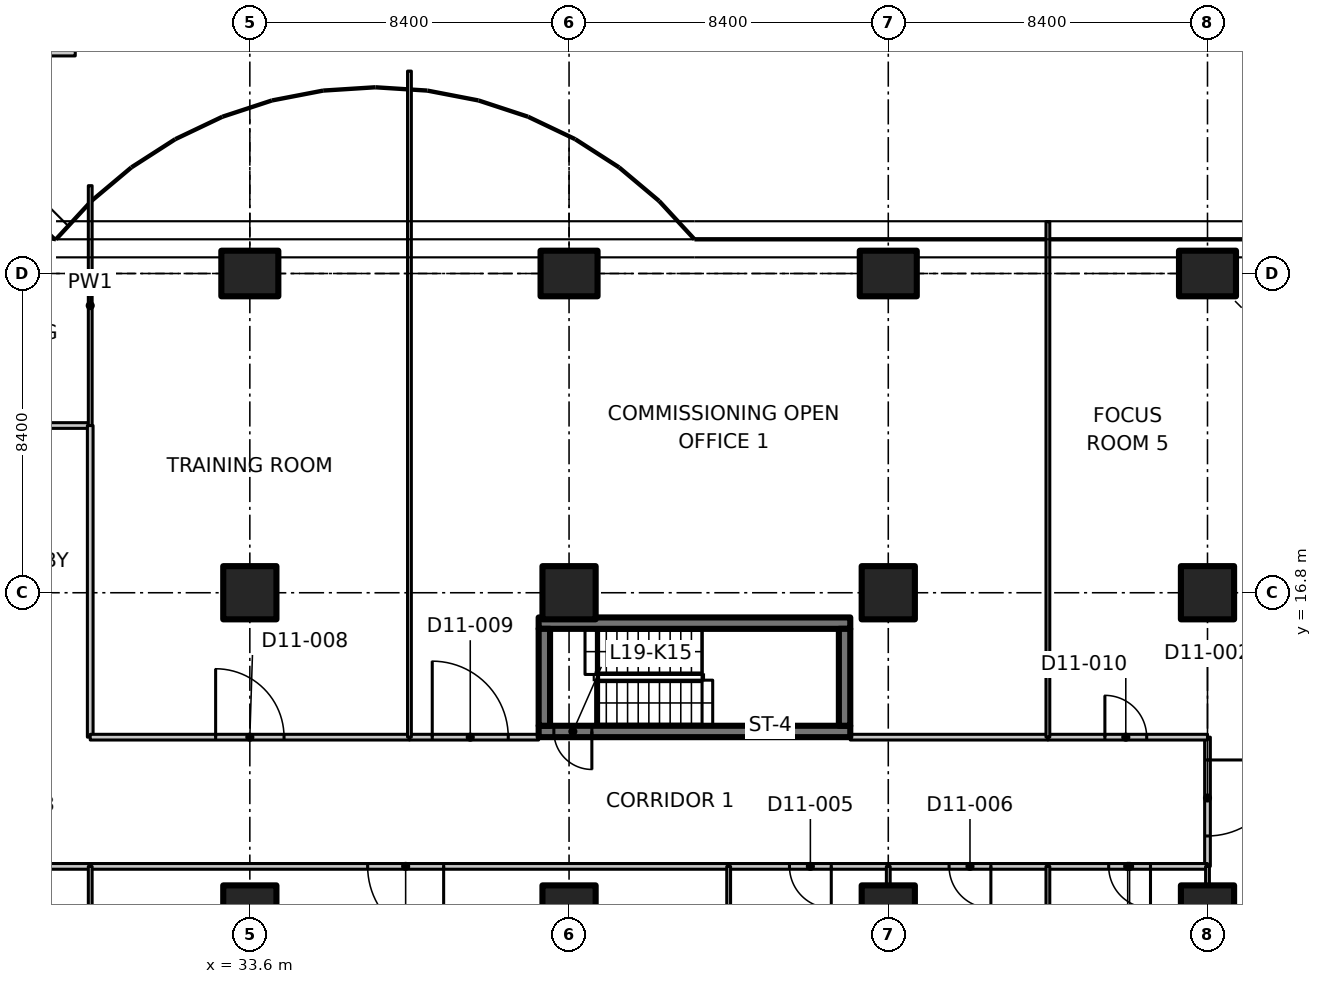
"""IFC4 building model, lengths in metres.
Left out: names, types, materials, properties, quantities, classifications, styles, units other than length and angle.
Written with IfcOpenShell. Run it as: python <this file> out.ifc"""

import sys

from ifc_helpers import new_model, si_unit, direction, frame, frame_2d, origin, origin_2d, place, context, subcontext, project, spatial, polyline, rectangle, outline, extrude, element, fill, save


model = new_model("IFC4")
c1 = context("Model", 3, precision=1e-05, world=origin(), true_north=direction((0.0, 1.0)))
c2 = subcontext(c1, "Body", "Model", "MODEL_VIEW")
j1 = project(units=[si_unit("LENGTHUNIT", "METRE"), si_unit("PLANEANGLEUNIT", "RADIAN")], contexts=[c1])
p1 = place(None, origin())
s1 = spatial("IfcSite", under=j1, at=p1, CompositionType="ELEMENT")
p2 = place(p1, origin())
s2 = spatial("IfcBuilding", under=s1, at=p2, CompositionType="ELEMENT")
p3 = place(p2, frame((0.0, 0.0, 83.3)))
s3 = spatial("IfcBuildingStorey", under=s2, at=p3, CompositionType="ELEMENT", Elevation=83.3)
for number, where, z_axis, x_axis in (
    (1, (33.6, 8.4, 0.0), (0.0, 0.0, 1.0), (1.0, 0.0, 0.0)),
    (2, (33.6, 16.8, 0.0), (0.0, 0.0, 1.0), (1.0, 0.0, 0.0)),
):
    element("IfcColumn", number, at=place(p3, frame(where, z_axis=z_axis, x_axis=x_axis)), inside=s3, PredefinedType="COLUMN", context=c2, shape_type="SweptSolid", body=[
        extrude(rectangle(XDim=1.4, YDim=1.4, at=origin_2d()), origin(), (0.0, 0.0, 1.0), 3.3),
    ])
p4 = place(p3, frame((33.6, 25.2, 0.0), z_axis=(0.0, 0.0, 1.0), x_axis=(0.0, 1.0, 0.0)))
e3 = element("IfcColumn", 3, at=p4, inside=s3, PredefinedType="COLUMN", context=c2, shape_type="SweptSolid", body=[
    extrude(rectangle(XDim=1.2, YDim=1.5, at=origin_2d()), origin(), (0.0, 0.0, 1.0), 3.3),
])
for number, where, z_axis, x_axis in (
    (4, (42.0, 8.4, 0.0), (0.0, 0.0, 1.0), (1.0, 0.0, 0.0)),
    (5, (42.0, 16.8, 0.0), (0.0, 0.0, 1.0), (1.0, 0.0, 0.0)),
):
    element("IfcColumn", number, at=place(p3, frame(where, z_axis=z_axis, x_axis=x_axis)), inside=s3, PredefinedType="COLUMN", context=c2, shape_type="SweptSolid", body=[
        extrude(rectangle(XDim=1.4, YDim=1.4, at=origin_2d()), origin(), (0.0, 0.0, 1.0), 3.3),
    ])
p5 = place(p3, frame((42.0, 25.2, 0.0), z_axis=(0.0, 0.0, 1.0), x_axis=(0.0, 1.0, 0.0)))
e6 = element("IfcColumn", 6, at=p5, inside=s3, PredefinedType="COLUMN", context=c2, shape_type="SweptSolid", body=[
    extrude(rectangle(XDim=1.2, YDim=1.5, at=origin_2d()), origin(), (0.0, 0.0, 1.0), 3.3),
])
for number, where, z_axis, x_axis in (
    (7, (50.4, 8.4, 0.0), (0.0, 0.0, 1.0), (1.0, 0.0, 0.0)),
    (8, (50.4, 16.8, 0.0), (0.0, 0.0, 1.0), (1.0, 0.0, 0.0)),
):
    element("IfcColumn", number, at=place(p3, frame(where, z_axis=z_axis, x_axis=x_axis)), inside=s3, PredefinedType="COLUMN", context=c2, shape_type="SweptSolid", body=[
        extrude(rectangle(XDim=1.4, YDim=1.4, at=origin_2d()), origin(), (0.0, 0.0, 1.0), 3.3),
    ])
p6 = place(p3, frame((50.4, 25.2, 0.0), z_axis=(0.0, 0.0, 1.0), x_axis=(0.0, 1.0, 0.0)))
e9 = element("IfcColumn", 9, at=p6, inside=s3, PredefinedType="COLUMN", context=c2, shape_type="SweptSolid", body=[
    extrude(rectangle(XDim=1.2, YDim=1.5, at=origin_2d()), origin(), (0.0, 0.0, 1.0), 3.3),
])
for number, where, z_axis, x_axis in (
    (10, (58.8, 8.4, 0.0), (0.0, 0.0, 1.0), (1.0, 0.0, 0.0)),
    (11, (58.8, 16.8, 0.0), (0.0, 0.0, 1.0), (1.0, 0.0, 0.0)),
):
    element("IfcColumn", number, at=place(p3, frame(where, z_axis=z_axis, x_axis=x_axis)), inside=s3, PredefinedType="COLUMN", context=c2, shape_type="SweptSolid", body=[
        extrude(rectangle(XDim=1.4, YDim=1.4, at=origin_2d()), origin(), (0.0, 0.0, 1.0), 3.3),
    ])
p7 = place(p3, frame((58.8, 25.2, 0.0), z_axis=(0.0, 0.0, 1.0), x_axis=(0.0, 1.0, 0.0)))
e12 = element("IfcColumn", 12, at=p7, inside=s3, PredefinedType="COLUMN", context=c2, shape_type="SweptSolid", body=[
    extrude(rectangle(XDim=1.2, YDim=1.5, at=origin_2d()), origin(), (0.0, 0.0, 1.0), 3.3),
])
p8 = place(p3, frame((49.4, 13.15, 0.0), z_axis=(0.0, 0.0, 1.0), x_axis=(-1.0, 0.0, 0.0)))
e13 = element("IfcWall", 13, at=p8, inside=s3, PredefinedType="SHEAR", context=c2, shape_type="SweptSolid", body=[
    extrude(rectangle(XDim=8.2, YDim=0.3, at=frame_2d((4.1, 0.0))), origin(), (0.0, 0.0, 1.0), 3.3),
])
p9 = place(p8, frame((6.8, 0.0, 0.0)))
e14 = element("IfcOpeningElement", 14, at=p9, cuts=e13, PredefinedType="OPENING", context=c2, shape_type="SweptSolid", body=[
    extrude(rectangle(XDim=1.0, YDim=2.1, at=frame_2d((0.5, 1.05))), frame((0.0, 0.16, 0.0), z_axis=(0.0, -1.0, 0.0), x_axis=(1.0, 0.0, 0.0)), (0.0, 0.0, 1.0), 0.32),
])
p10 = place(p3, frame((41.2, 16.0, 0.0), z_axis=(0.0, 0.0, 1.0), x_axis=(1.0, 0.0, 0.0)))
e15 = element("IfcWall", 15, at=p10, inside=s3, PredefinedType="SHEAR", context=c2, shape_type="SweptSolid", body=[
    extrude(rectangle(XDim=8.2, YDim=0.3, at=frame_2d((4.1, 0.0))), origin(), (0.0, 0.0, 1.0), 3.3),
])
for number, where, z_axis, x_axis in (
    (16, (41.35, 13.3, 0.0), (0.0, 0.0, 1.0), (0.0, 1.0, 0.0)),
    (17, (49.25, 13.3, 0.0), (0.0, 0.0, 1.0), (0.0, 1.0, 0.0)),
):
    element("IfcWall", number, at=place(p3, frame(where, z_axis=z_axis, x_axis=x_axis)), inside=s3, PredefinedType="SHEAR", context=c2, shape_type="SweptSolid", body=[
        extrude(rectangle(XDim=2.55, YDim=0.3, at=frame_2d((1.275, 0.0))), origin(), (0.0, 0.0, 1.0), 3.3),
    ])
p11 = place(p3, frame((25.2, 21.2, 0.0), z_axis=(0.0, 0.0, 1.0), x_axis=(1.0, 0.0, 0.0)))
e18 = element("IfcWall", 18, at=p11, inside=s3, PredefinedType="PARTITIONING", context=c2, shape_type="SweptSolid", body=[
    extrude(rectangle(XDim=4.2, YDim=0.15, at=frame_2d((2.1, 0.0))), origin(), (0.0, 0.0, 1.0), 3.28),
])
p12 = place(p3, frame((29.4, 9.6, 0.0), z_axis=(0.0, 0.0, 1.0), x_axis=(-1.0, 0.0, 0.0)))
e19 = element("IfcWall", 19, at=p12, inside=s3, PredefinedType="PARTITIONING", context=c2, shape_type="SweptSolid", body=[
    extrude(rectangle(XDim=4.2, YDim=0.15, at=frame_2d((2.1, 0.0))), origin(), (0.0, 0.0, 1.0), 3.28),
])
p13 = place(p12, frame((1.5, 0.0, 0.0)))
e20 = element("IfcOpeningElement", 20, at=p13, cuts=e19, PredefinedType="OPENING", context=c2, shape_type="SweptSolid", body=[
    extrude(rectangle(XDim=1.1, YDim=2.1, at=frame_2d((0.55, 1.05))), frame((0.0, 0.085, 0.0), z_axis=(0.0, -1.0, 0.0), x_axis=(1.0, 0.0, 0.0)), (0.0, 0.0, 1.0), 0.17),
])
p14 = place(p3, frame((29.4, 21.2, 0.0), z_axis=(0.0, 0.0, 1.0), x_axis=(0.0, -1.0, 0.0)))
e21 = element("IfcWall", 21, at=p14, inside=s3, PredefinedType="PARTITIONING", context=c2, shape_type="SweptSolid", body=[
    extrude(rectangle(XDim=8.2, YDim=0.15, at=frame_2d((4.1, 0.0))), origin(), (0.0, 0.0, 1.0), 3.28),
])
p15 = place(p3, frame((29.4, 27.511, 0.0), z_axis=(0.0, 0.0, 1.0), x_axis=(0.0, -1.0, 0.0)))
e22 = element("IfcWall", 22, at=p15, inside=s3, PredefinedType="PARTITIONING", context=c2, shape_type="SweptSolid", body=[
    extrude(outline(polyline([(0.0, 0.0), (6.311, 0.0), (6.311, 3.28), (2.761, 3.28), (2.759, 2.93), (1.863, 2.93), (1.861, 3.28), (0.236, 3.28), (0.0, 3.28), (0.0, 0.0)])), frame((0.0, 0.05, 0.0), z_axis=(0.0, -1.0, 0.0), x_axis=(1.0, 0.0, 0.0)), (0.0, 0.0, 1.0), 0.1),
])
p16 = place(p3, frame((25.2, 31.0, 0.0), z_axis=(0.0, 0.0, 1.0), x_axis=(1.0, 0.0, 0.0)))
e23 = element("IfcWall", 23, at=p16, inside=s3, PredefinedType="PARTITIONING", context=c2, shape_type="SweptSolid", body=[
    extrude(rectangle(XDim=3.806, YDim=0.15, at=frame_2d((1.903, 0.0))), origin(), (0.0, 0.0, 1.0), 2.93),
])
p17 = place(p3, frame((58.8, 13.0, 0.0), z_axis=(0.0, 0.0, 1.0), x_axis=(0.0, -1.0, 0.0)))
e24 = element("IfcWall", 24, at=p17, inside=s3, PredefinedType="PARTITIONING", context=c2, shape_type="SweptSolid", body=[
    extrude(rectangle(XDim=3.4, YDim=0.15, at=frame_2d((1.7, 0.0))), origin(), (0.0, 0.0, 1.0), 3.28),
])
p18 = place(p17, frame((0.6, 0.0, 0.0)))
e25 = element("IfcOpeningElement", 25, at=p18, cuts=e24, PredefinedType="OPENING", context=c2, shape_type="SweptSolid", body=[
    extrude(rectangle(XDim=2.0, YDim=2.4, at=frame_2d((1.0, 1.2))), frame((0.0, 0.085, 0.0), z_axis=(0.0, -1.0, 0.0), x_axis=(1.0, 0.0, 0.0)), (0.0, 0.0, 1.0), 0.17),
])
p19 = place(p3, frame((46.2, 9.6, 0.0), z_axis=(0.0, 0.0, 1.0), x_axis=(-1.0, 0.0, 0.0)))
e26 = element("IfcWall", 26, at=p19, inside=s3, PredefinedType="PARTITIONING", context=c2, shape_type="SweptSolid", body=[
    extrude(rectangle(XDim=16.8, YDim=0.15, at=frame_2d((8.4, 0.0))), origin(), (0.0, 0.0, 1.0), 3.28),
])
p20 = place(p19, frame((7.5, 0.0, 0.0)))
e27 = element("IfcOpeningElement", 27, at=p20, cuts=e26, PredefinedType="OPENING", context=c2, shape_type="SweptSolid", body=[
    extrude(rectangle(XDim=2.0, YDim=2.4, at=frame_2d((1.0, 1.2))), frame((0.0, 0.085, 0.0), z_axis=(0.0, -1.0, 0.0), x_axis=(1.0, 0.0, 0.0)), (0.0, 0.0, 1.0), 0.17),
])
p21 = place(p3, frame((50.4, 9.6, 0.0), z_axis=(0.0, 0.0, 1.0), x_axis=(-1.0, 0.0, 0.0)))
e28 = element("IfcWall", 28, at=p21, inside=s3, PredefinedType="PARTITIONING", context=c2, shape_type="SweptSolid", body=[
    extrude(rectangle(XDim=4.2, YDim=0.15, at=frame_2d((2.1, 0.0))), origin(), (0.0, 0.0, 1.0), 3.28),
])
p22 = place(p21, frame((1.5, 0.0, 0.0)))
e29 = element("IfcOpeningElement", 29, at=p22, cuts=e28, PredefinedType="OPENING", context=c2, shape_type="SweptSolid", body=[
    extrude(rectangle(XDim=1.1, YDim=2.1, at=frame_2d((0.55, 1.05))), frame((0.0, 0.085, 0.0), z_axis=(0.0, -1.0, 0.0), x_axis=(1.0, 0.0, 0.0)), (0.0, 0.0, 1.0), 0.17),
])
p23 = place(p3, frame((54.6, 9.6, 0.0), z_axis=(0.0, 0.0, 1.0), x_axis=(-1.0, 0.0, 0.0)))
e30 = element("IfcWall", 30, at=p23, inside=s3, PredefinedType="PARTITIONING", context=c2, shape_type="SweptSolid", body=[
    extrude(rectangle(XDim=4.2, YDim=0.15, at=frame_2d((2.1, 0.0))), origin(), (0.0, 0.0, 1.0), 3.28),
])
p24 = place(p23, frame((1.5, 0.0, 0.0)))
e31 = element("IfcOpeningElement", 31, at=p24, cuts=e30, PredefinedType="OPENING", context=c2, shape_type="SweptSolid", body=[
    extrude(rectangle(XDim=1.1, YDim=2.1, at=frame_2d((0.55, 1.05))), frame((0.0, 0.085, 0.0), z_axis=(0.0, -1.0, 0.0), x_axis=(1.0, 0.0, 0.0)), (0.0, 0.0, 1.0), 0.17),
])
p25 = place(p3, frame((58.8, 9.6, 0.0), z_axis=(0.0, 0.0, 1.0), x_axis=(-1.0, 0.0, 0.0)))
e32 = element("IfcWall", 32, at=p25, inside=s3, PredefinedType="PARTITIONING", context=c2, shape_type="SweptSolid", body=[
    extrude(rectangle(XDim=4.2, YDim=0.15, at=frame_2d((2.1, 0.0))), origin(), (0.0, 0.0, 1.0), 3.28),
])
p26 = place(p25, frame((1.5, 0.0, 0.0)))
e33 = element("IfcOpeningElement", 33, at=p26, cuts=e32, PredefinedType="OPENING", context=c2, shape_type="SweptSolid", body=[
    extrude(rectangle(XDim=1.1, YDim=2.1, at=frame_2d((0.55, 1.05))), frame((0.0, 0.085, 0.0), z_axis=(0.0, -1.0, 0.0), x_axis=(1.0, 0.0, 0.0)), (0.0, 0.0, 1.0), 0.17),
])
p27 = place(p3, frame((29.4, 13.0, 0.0), z_axis=(0.0, 0.0, 1.0), x_axis=(1.0, 0.0, 0.0)))
e34 = element("IfcWall", 34, at=p27, inside=s3, PredefinedType="PARTITIONING", context=c2, shape_type="SweptSolid", body=[
    extrude(rectangle(XDim=8.4, YDim=0.15, at=frame_2d((4.2, 0.0))), origin(), (0.0, 0.0, 1.0), 3.28),
])
p28 = place(p27, frame((3.3, 0.0, 0.0)))
e35 = element("IfcOpeningElement", 35, at=p28, cuts=e34, PredefinedType="OPENING", context=c2, shape_type="SweptSolid", body=[
    extrude(rectangle(XDim=1.8, YDim=2.1, at=frame_2d((0.9, 1.05))), frame((0.0, 0.085, 0.0), z_axis=(0.0, -1.0, 0.0), x_axis=(1.0, 0.0, 0.0)), (0.0, 0.0, 1.0), 0.17),
])
p29 = place(p3, frame((37.8, 13.0, 0.0), z_axis=(0.0, 0.0, 1.0), x_axis=(1.0, 0.0, 0.0)))
e36 = element("IfcWall", 36, at=p29, inside=s3, PredefinedType="PARTITIONING", context=c2, shape_type="SweptSolid", body=[
    extrude(rectangle(XDim=3.4, YDim=0.15, at=frame_2d((1.7, 0.0))), origin(), (0.0, 0.0, 1.0), 3.28),
])
p30 = place(p29, frame((0.6, 0.0, 0.0)))
e37 = element("IfcOpeningElement", 37, at=p30, cuts=e36, PredefinedType="OPENING", context=c2, shape_type="SweptSolid", body=[
    extrude(rectangle(XDim=2.0, YDim=2.4, at=frame_2d((1.0, 1.2))), frame((0.0, 0.085, 0.0), z_axis=(0.0, -1.0, 0.0), x_axis=(1.0, 0.0, 0.0)), (0.0, 0.0, 1.0), 0.17),
])
p31 = place(p3, frame((49.4, 13.0, 0.0), z_axis=(0.0, 0.0, 1.0), x_axis=(1.0, 0.0, 0.0)))
e38 = element("IfcWall", 38, at=p31, inside=s3, PredefinedType="PARTITIONING", context=c2, shape_type="SweptSolid", body=[
    extrude(rectangle(XDim=5.2, YDim=0.15, at=frame_2d((2.6, 0.0))), origin(), (0.0, 0.0, 1.0), 3.28),
])
p32 = place(p3, frame((54.6, 13.0, 0.0), z_axis=(0.0, 0.0, 1.0), x_axis=(1.0, 0.0, 0.0)))
e39 = element("IfcWall", 39, at=p32, inside=s3, PredefinedType="PARTITIONING", context=c2, shape_type="SweptSolid", body=[
    extrude(rectangle(XDim=4.2, YDim=0.15, at=frame_2d((2.1, 0.0))), origin(), (0.0, 0.0, 1.0), 3.28),
])
p33 = place(p32, frame((1.5, 0.0, 0.0)))
e40 = element("IfcOpeningElement", 40, at=p33, cuts=e39, PredefinedType="OPENING", context=c2, shape_type="SweptSolid", body=[
    extrude(rectangle(XDim=1.1, YDim=2.1, at=frame_2d((0.55, 1.05))), frame((0.0, 0.085, 0.0), z_axis=(0.0, -1.0, 0.0), x_axis=(1.0, 0.0, 0.0)), (0.0, 0.0, 1.0), 0.17),
])
p34 = place(p3, frame((58.8, 9.12, 0.0), z_axis=(0.0, 0.0, 1.0), x_axis=(0.0, 1.0, 0.0)))
e41 = element("IfcWall", 41, at=p34, inside=s3, PredefinedType="PARTITIONING", context=c2, shape_type="SweptSolid", body=[
    extrude(rectangle(XDim=0.48, YDim=0.1, at=frame_2d((0.24, 0.0))), origin(), (0.0, 0.0, 1.0), 3.28),
])
for number, where, z_axis, x_axis in (
    (42, (29.4, 9.6, 0.0), (0.0, 0.0, 1.0), (0.0, -1.0, 0.0)),
    (43, (46.2, 9.6, 0.0), (0.0, 0.0, 1.0), (0.0, -1.0, 0.0)),
):
    element("IfcWall", number, at=place(p3, frame(where, z_axis=z_axis, x_axis=x_axis)), inside=s3, PredefinedType="PARTITIONING", context=c2, shape_type="SweptSolid", body=[
        extrude(outline(polyline([(0.0, 0.0), (10.774, 0.0), (10.774, 3.28), (10.7, 3.28), (10.05, 3.28), (10.048, 2.93), (9.152, 2.93), (9.15, 3.28), (0.0, 3.28), (0.0, 0.0)])), frame((0.0, 0.05, 0.0), z_axis=(0.0, -1.0, 0.0), x_axis=(1.0, 0.0, 0.0)), (0.0, 0.0, 1.0), 0.1),
    ])
p35 = place(p3, frame((50.4, 9.6, 0.0), z_axis=(0.0, 0.0, 1.0), x_axis=(0.0, -1.0, 0.0)))
e44 = element("IfcWall", 44, at=p35, inside=s3, PredefinedType="PARTITIONING", context=c2, shape_type="SweptSolid", body=[
    extrude(rectangle(XDim=0.48, YDim=0.1, at=frame_2d((0.24, 0.0))), origin(), (0.0, 0.0, 1.0), 3.28),
])
p36 = place(p3, frame((54.6, 9.6, 0.0), z_axis=(0.0, 0.0, 1.0), x_axis=(0.0, -1.0, 0.0)))
e45 = element("IfcWall", 45, at=p36, inside=s3, PredefinedType="PARTITIONING", context=c2, shape_type="SweptSolid", body=[
    extrude(outline(polyline([(0.0, 0.0), (10.774, 0.0), (10.774, 3.28), (10.7, 3.28), (10.05, 3.28), (10.048, 2.93), (9.152, 2.93), (9.15, 3.28), (0.0, 3.28), (0.0, 0.0)])), frame((0.0, 0.05, 0.0), z_axis=(0.0, -1.0, 0.0), x_axis=(1.0, 0.0, 0.0)), (0.0, 0.0, 1.0), 0.1),
])
p37 = place(p3, frame((37.8, 30.526, 0.0), z_axis=(0.0, 0.0, 1.0), x_axis=(0.0, -1.0, 0.0)))
e46 = element("IfcWall", 46, at=p37, inside=s3, PredefinedType="PARTITIONING", context=c2, shape_type="SweptSolid", body=[
    extrude(outline(polyline([(0.0, 0.0), (17.526, 0.0), (17.526, 3.28), (5.776, 3.28), (5.774, 2.93), (4.878, 2.93), (4.876, 3.28), (0.283, 3.28), (0.0, 3.28), (0.0, 0.0)])), frame((0.0, 0.05, 0.0), z_axis=(0.0, -1.0, 0.0), x_axis=(1.0, 0.0, 0.0)), (0.0, 0.0, 1.0), 0.1),
])
p38 = place(p3, frame((54.6, 26.565, 0.0), z_axis=(0.0, 0.0, 1.0), x_axis=(0.0, -1.0, 0.0)))
e47 = element("IfcWall", 47, at=p38, inside=s3, PredefinedType="PARTITIONING", context=c2, shape_type="SweptSolid", body=[
    extrude(outline(polyline([(0.0, 0.0), (13.565, 0.0), (13.565, 3.28), (1.815, 3.28), (1.813, 2.93), (0.917, 2.93), (0.915, 3.28), (0.265, 3.28), (0.0, 3.28), (0.0, 0.0)])), frame((0.0, 0.05, 0.0), z_axis=(0.0, -1.0, 0.0), x_axis=(1.0, 0.0, 0.0)), (0.0, 0.0, 1.0), 0.1),
])
p39 = place(p9, origin())
e48 = element("IfcDoor", 48, at=p39, inside=s3, OperationType="SINGLE_SWING_LEFT", PredefinedType="DOOR", context=c2, shape_type="SweptSolid", body=[
    extrude(rectangle(XDim=1.0, YDim=2.1, at=frame_2d((0.5, 1.05))), frame((0.0, 0.025, 0.0), z_axis=(0.0, -1.0, 0.0), x_axis=(1.0, 0.0, 0.0)), (0.0, 0.0, 1.0), 0.05),
])
fill(e14, e48)
p40 = place(p18, origin())
e49 = element("IfcDoor", 49, at=p40, inside=s3, OperationType="DOUBLE_DOOR_SINGLE_SWING", PredefinedType="DOOR", context=c2, shape_type="SweptSolid", body=[
    extrude(rectangle(XDim=2.0, YDim=2.4, at=frame_2d((1.0, 1.2))), frame((0.0, 0.025, 0.0), z_axis=(0.0, -1.0, 0.0), x_axis=(1.0, 0.0, 0.0)), (0.0, 0.0, 1.0), 0.05),
])
fill(e25, e49)
p41 = place(p20, origin())
e50 = element("IfcDoor", 50, at=p41, inside=s3, OperationType="DOUBLE_DOOR_SINGLE_SWING", PredefinedType="DOOR", context=c2, shape_type="SweptSolid", body=[
    extrude(rectangle(XDim=2.0, YDim=2.4, at=frame_2d((1.0, 1.2))), frame((0.0, 0.025, 0.0), z_axis=(0.0, -1.0, 0.0), x_axis=(1.0, 0.0, 0.0)), (0.0, 0.0, 1.0), 0.05),
])
fill(e27, e50)
p42 = place(p22, origin())
e51 = element("IfcDoor", 51, at=p42, inside=s3, OperationType="SINGLE_SWING_LEFT", PredefinedType="DOOR", context=c2, shape_type="SweptSolid", body=[
    extrude(rectangle(XDim=1.1, YDim=2.1, at=frame_2d((0.55, 1.05))), frame((0.0, 0.025, 0.0), z_axis=(0.0, -1.0, 0.0), x_axis=(1.0, 0.0, 0.0)), (0.0, 0.0, 1.0), 0.05),
])
fill(e29, e51)
p43 = place(p24, origin())
e52 = element("IfcDoor", 52, at=p43, inside=s3, OperationType="SINGLE_SWING_LEFT", PredefinedType="DOOR", context=c2, shape_type="SweptSolid", body=[
    extrude(rectangle(XDim=1.1, YDim=2.1, at=frame_2d((0.55, 1.05))), frame((0.0, 0.025, 0.0), z_axis=(0.0, -1.0, 0.0), x_axis=(1.0, 0.0, 0.0)), (0.0, 0.0, 1.0), 0.05),
])
fill(e31, e52)
p44 = place(p26, origin())
e53 = element("IfcDoor", 53, at=p44, inside=s3, OperationType="SINGLE_SWING_LEFT", PredefinedType="DOOR", context=c2, shape_type="SweptSolid", body=[
    extrude(rectangle(XDim=1.1, YDim=2.1, at=frame_2d((0.55, 1.05))), frame((0.0, 0.025, 0.0), z_axis=(0.0, -1.0, 0.0), x_axis=(1.0, 0.0, 0.0)), (0.0, 0.0, 1.0), 0.05),
])
fill(e33, e53)
p45 = place(p28, origin())
e54 = element("IfcDoor", 54, at=p45, inside=s3, OperationType="DOUBLE_DOOR_SINGLE_SWING", PredefinedType="DOOR", context=c2, shape_type="SweptSolid", body=[
    extrude(rectangle(XDim=1.8, YDim=2.1, at=frame_2d((0.9, 1.05))), frame((0.0, 0.025, 0.0), z_axis=(0.0, -1.0, 0.0), x_axis=(1.0, 0.0, 0.0)), (0.0, 0.0, 1.0), 0.05),
])
fill(e35, e54)
p46 = place(p30, origin())
e55 = element("IfcDoor", 55, at=p46, inside=s3, OperationType="DOUBLE_DOOR_SINGLE_SWING", PredefinedType="DOOR", context=c2, shape_type="SweptSolid", body=[
    extrude(rectangle(XDim=2.0, YDim=2.4, at=frame_2d((1.0, 1.2))), frame((0.0, 0.025, 0.0), z_axis=(0.0, -1.0, 0.0), x_axis=(1.0, 0.0, 0.0)), (0.0, 0.0, 1.0), 0.05),
])
fill(e37, e55)
p47 = place(p33, origin())
e56 = element("IfcDoor", 56, at=p47, inside=s3, OperationType="SINGLE_SWING_LEFT", PredefinedType="DOOR", context=c2, shape_type="SweptSolid", body=[
    extrude(rectangle(XDim=1.1, YDim=2.1, at=frame_2d((0.55, 1.05))), frame((0.0, 0.025, 0.0), z_axis=(0.0, -1.0, 0.0), x_axis=(1.0, 0.0, 0.0)), (0.0, 0.0, 1.0), 0.05),
])
fill(e40, e56)
save(model, sys.argv[1])
